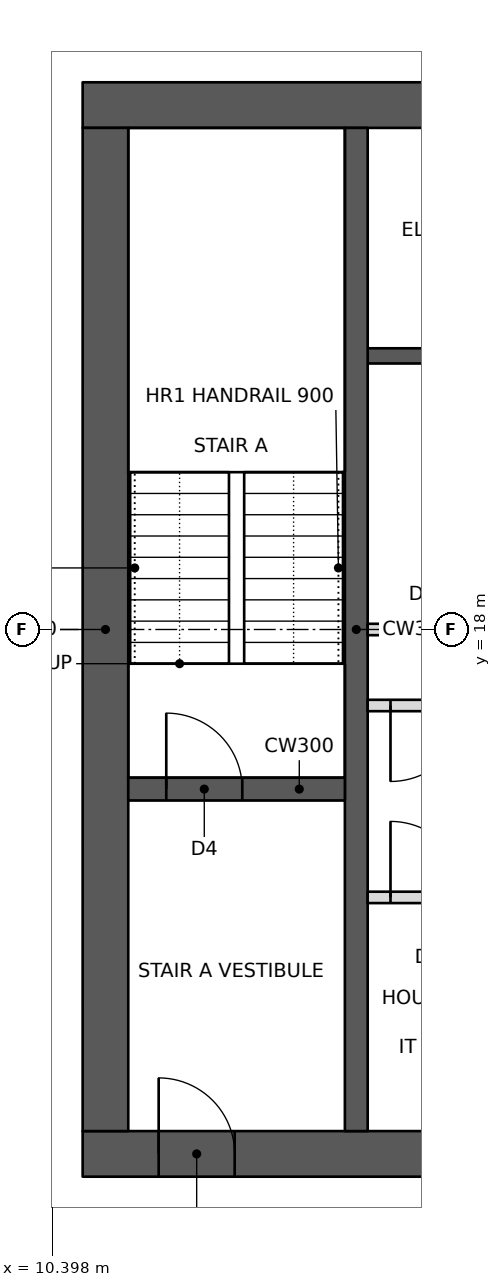
"""IFC4 building model, lengths in metres.
Left out: names, types, materials, properties, quantities, classifications, styles, units other than length and angle.
Written with IfcOpenShell. Run it as: python <this file> out.ifc"""

import sys

from ifc_helpers import new_model, si_unit, direction, frame, frame_2d, origin, place, context, subcontext, project, spatial, rectangle, extrude, element, fill, save


model = new_model("IFC4")
c1 = context("Model", 3, precision=1e-05, world=origin(), true_north=direction((0.0, 1.0)))
c2 = subcontext(c1, "Body", "Model", "MODEL_VIEW")
j1 = project(units=[si_unit("LENGTHUNIT", "METRE"), si_unit("PLANEANGLEUNIT", "RADIAN")], contexts=[c1])
p1 = place(None, origin())
s1 = spatial("IfcSite", under=j1, at=p1, CompositionType="ELEMENT")
p2 = place(p1, origin())
s2 = spatial("IfcBuilding", under=s1, at=p2, CompositionType="ELEMENT")
p3 = place(p2, frame((0.0, 0.0, 197.8)))
s3 = spatial("IfcBuildingStorey", under=s2, at=p3, CompositionType="ELEMENT", Elevation=197.8)
p4 = place(p3, frame((10.8, 11.1, 0.0), z_axis=(0.0, 0.0, 1.0), x_axis=(1.0, 0.0, 0.0)))
e1 = element("IfcWall", 1, at=p4, inside=s3, PredefinedType="SHEAR", context=c2, shape_type="SweptSolid", body=[
    extrude(rectangle(XDim=23.4, YDim=0.6, at=frame_2d((11.7, 0.0))), origin(), (0.0, 0.0, 1.0), 3.4),
])
p5 = place(p4, frame((1.0, 0.0, 0.0)))
e2 = element("IfcOpeningElement", 2, at=p5, cuts=e1, PredefinedType="OPENING", context=c2, shape_type="SweptSolid", body=[
    extrude(rectangle(XDim=1.0, YDim=2.1, at=frame_2d((0.5, 1.05))), frame((0.0, 0.31, 0.0), z_axis=(0.0, -1.0, 0.0), x_axis=(1.0, 0.0, 0.0)), (0.0, 0.0, 1.0), 0.62),
])
p6 = place(p4, frame((17.2, 0.0, 0.0)))
e3 = element("IfcOpeningElement", 3, at=p6, cuts=e1, PredefinedType="OPENING", context=c2, shape_type="SweptSolid", body=[
    extrude(rectangle(XDim=1.8, YDim=2.1, at=frame_2d((0.9, 1.05))), frame((0.0, 0.31, 0.0), z_axis=(0.0, -1.0, 0.0), x_axis=(1.0, 0.0, 0.0)), (0.0, 0.0, 1.0), 0.62),
])
p7 = place(p3, frame((10.8, 24.9, 0.0), z_axis=(0.0, 0.0, 1.0), x_axis=(1.0, 0.0, 0.0)))
e4 = element("IfcWall", 4, at=p7, inside=s3, PredefinedType="SHEAR", context=c2, shape_type="SweptSolid", body=[
    extrude(rectangle(XDim=23.4, YDim=0.6, at=frame_2d((11.7, 0.0))), origin(), (0.0, 0.0, 1.0), 3.4),
])
p8 = place(p7, frame((17.2, 0.0, 0.0)))
e5 = element("IfcOpeningElement", 5, at=p8, cuts=e4, PredefinedType="OPENING", context=c2, shape_type="SweptSolid", body=[
    extrude(rectangle(XDim=1.8, YDim=2.1, at=frame_2d((0.9, 1.05))), frame((0.0, 0.31, 0.0), z_axis=(0.0, -1.0, 0.0), x_axis=(1.0, 0.0, 0.0)), (0.0, 0.0, 1.0), 0.62),
])
p9 = place(p7, frame((21.1, 0.0, 0.0)))
e6 = element("IfcOpeningElement", 6, at=p9, cuts=e4, PredefinedType="OPENING", context=c2, shape_type="SweptSolid", body=[
    extrude(rectangle(XDim=1.0, YDim=2.1, at=frame_2d((0.5, 1.05))), frame((0.0, 0.31, 0.0), z_axis=(0.0, -1.0, 0.0), x_axis=(1.0, 0.0, 0.0)), (0.0, 0.0, 1.0), 0.62),
])
p10 = place(p7, frame((4.9, 0.0, 0.0)))
e7 = element("IfcOpeningElement", 7, at=p10, cuts=e4, PredefinedType="OPENING", context=c2, shape_type="SweptSolid", body=[
    extrude(rectangle(XDim=1.0, YDim=2.1, at=frame_2d((0.5, 1.05))), frame((0.0, 0.31, 0.0), z_axis=(0.0, -1.0, 0.0), x_axis=(1.0, 0.0, 0.0)), (0.0, 0.0, 1.0), 0.62),
])
p11 = place(p3, frame((11.1, 11.4, 0.0), z_axis=(0.0, 0.0, 1.0), x_axis=(0.0, 1.0, 0.0)))
e8 = element("IfcWall", 8, at=p11, inside=s3, PredefinedType="SHEAR", context=c2, shape_type="SweptSolid", body=[
    extrude(rectangle(XDim=13.2, YDim=0.6, at=frame_2d((6.6, 0.0))), origin(), (0.0, 0.0, 1.0), 3.4),
])
p12 = place(p3, frame((14.4, 11.4, 0.0), z_axis=(0.0, 0.0, 1.0), x_axis=(0.0, 1.0, 0.0)))
e9 = element("IfcWall", 9, at=p12, inside=s3, PredefinedType="SHEAR", context=c2, shape_type="SweptSolid", body=[
    extrude(rectangle(XDim=13.2, YDim=0.3, at=frame_2d((6.6, 0.0))), origin(), (0.0, 0.0, 1.0), 3.4),
])
p13 = place(p3, frame((11.4, 15.9, 0.0), z_axis=(0.0, 0.0, 1.0), x_axis=(1.0, 0.0, 0.0)))
e10 = element("IfcWall", 10, at=p13, inside=s3, PredefinedType="SHEAR", context=c2, shape_type="SweptSolid", body=[
    extrude(rectangle(XDim=2.85, YDim=0.3, at=frame_2d((1.425, 0.0))), origin(), (0.0, 0.0, 1.0), 3.4),
])
p14 = place(p13, frame((0.5, 0.0, 0.0)))
e11 = element("IfcOpeningElement", 11, at=p14, cuts=e10, PredefinedType="OPENING", context=c2, shape_type="SweptSolid", body=[
    extrude(rectangle(XDim=1.0, YDim=2.1, at=frame_2d((0.5, 1.05))), frame((0.0, 0.16, 0.0), z_axis=(0.0, -1.0, 0.0), x_axis=(1.0, 0.0, 0.0)), (0.0, 0.0, 1.0), 0.32),
])
p15 = place(p3, frame((14.55, 18.0, 0.0), z_axis=(0.0, 0.0, 1.0), x_axis=(1.0, 0.0, 0.0)))
e12 = element("IfcWall", 12, at=p15, inside=s3, PredefinedType="PARTITIONING", context=c2, shape_type="SweptSolid", body=[
    extrude(rectangle(XDim=3.3, YDim=0.15, at=frame_2d((1.65, 0.0))), origin(), (0.0, 0.0, 1.0), 3.2),
])
p16 = place(p3, frame((14.55, 21.6, 0.0), z_axis=(0.0, 0.0, 1.0), x_axis=(1.0, 0.0, 0.0)))
e13 = element("IfcWall", 13, at=p16, inside=s3, PredefinedType="SHEAR", context=c2, shape_type="SweptSolid", body=[
    extrude(rectangle(XDim=3.3, YDim=0.2, at=frame_2d((1.65, 0.0))), origin(), (0.0, 0.0, 1.0), 3.4),
])
p17 = place(p3, frame((14.55, 17.0, 0.0), z_axis=(0.0, 0.0, 1.0), x_axis=(1.0, 0.0, 0.0)))
e14 = element("IfcWall", 14, at=p17, inside=s3, PredefinedType="PARTITIONING", context=c2, shape_type="SweptSolid", body=[
    extrude(rectangle(XDim=3.3, YDim=0.15, at=frame_2d((1.65, 0.0))), origin(), (0.0, 0.0, 1.0), 3.2),
])
p18 = place(p17, frame((0.3, 0.0, 0.0)))
e15 = element("IfcOpeningElement", 15, at=p18, cuts=e14, PredefinedType="OPENING", context=c2, shape_type="SweptSolid", body=[
    extrude(rectangle(XDim=1.0, YDim=2.1, at=frame_2d((0.5, 1.05))), frame((0.0, 0.085, 0.0), z_axis=(0.0, -1.0, 0.0), x_axis=(1.0, 0.0, 0.0)), (0.0, 0.0, 1.0), 0.17),
])
p19 = place(p3, frame((14.55, 14.475, 0.0), z_axis=(0.0, 0.0, 1.0), x_axis=(1.0, 0.0, 0.0)))
e16 = element("IfcWall", 16, at=p19, inside=s3, PredefinedType="PARTITIONING", context=c2, shape_type="SweptSolid", body=[
    extrude(rectangle(XDim=3.3, YDim=0.15, at=frame_2d((1.65, 0.0))), origin(), (0.0, 0.0, 1.0), 3.2),
])
p20 = place(p19, frame((0.3, 0.0, 0.0)))
e17 = element("IfcOpeningElement", 17, at=p20, cuts=e16, PredefinedType="OPENING", context=c2, shape_type="SweptSolid", body=[
    extrude(rectangle(XDim=1.0, YDim=2.1, at=frame_2d((0.5, 1.05))), frame((0.0, 0.085, 0.0), z_axis=(0.0, -1.0, 0.0), x_axis=(1.0, 0.0, 0.0)), (0.0, 0.0, 1.0), 0.17),
])
p21 = place(p18, frame((1.0, 0.0, 0.0), z_axis=(0.0, 0.0, 1.0), x_axis=(-1.0, 0.0, 0.0)))
e18 = element("IfcDoor", 18, at=p21, inside=s3, OperationType="SINGLE_SWING_RIGHT", PredefinedType="DOOR", context=c2, shape_type="SweptSolid", body=[
    extrude(rectangle(XDim=1.0, YDim=2.1, at=frame_2d((0.5, 1.05))), frame((0.0, 0.025, 0.0), z_axis=(0.0, -1.0, 0.0), x_axis=(1.0, 0.0, 0.0)), (0.0, 0.0, 1.0), 0.05),
])
fill(e15, e18)
p22 = place(p20, origin())
e19 = element("IfcDoor", 19, at=p22, inside=s3, OperationType="SINGLE_SWING_LEFT", PredefinedType="DOOR", context=c2, shape_type="SweptSolid", body=[
    extrude(rectangle(XDim=1.0, YDim=2.1, at=frame_2d((0.5, 1.05))), frame((0.0, 0.025, 0.0), z_axis=(0.0, -1.0, 0.0), x_axis=(1.0, 0.0, 0.0)), (0.0, 0.0, 1.0), 0.05),
])
fill(e17, e19)
p23 = place(p5, origin())
e20 = element("IfcDoor", 20, at=p23, inside=s3, OperationType="SINGLE_SWING_LEFT", PredefinedType="DOOR", context=c2, shape_type="SweptSolid", body=[
    extrude(rectangle(XDim=1.0, YDim=2.1, at=frame_2d((0.5, 1.05))), frame((0.0, 0.025, 0.0), z_axis=(0.0, -1.0, 0.0), x_axis=(1.0, 0.0, 0.0)), (0.0, 0.0, 1.0), 0.05),
])
fill(e2, e20)
p24 = place(p14, origin())
e21 = element("IfcDoor", 21, at=p24, inside=s3, OperationType="SINGLE_SWING_LEFT", PredefinedType="DOOR", context=c2, shape_type="SweptSolid", body=[
    extrude(rectangle(XDim=1.0, YDim=2.1, at=frame_2d((0.5, 1.05))), frame((0.0, 0.025, 0.0), z_axis=(0.0, -1.0, 0.0), x_axis=(1.0, 0.0, 0.0)), (0.0, 0.0, 1.0), 0.05),
])
fill(e11, e21)
save(model, sys.argv[1])
